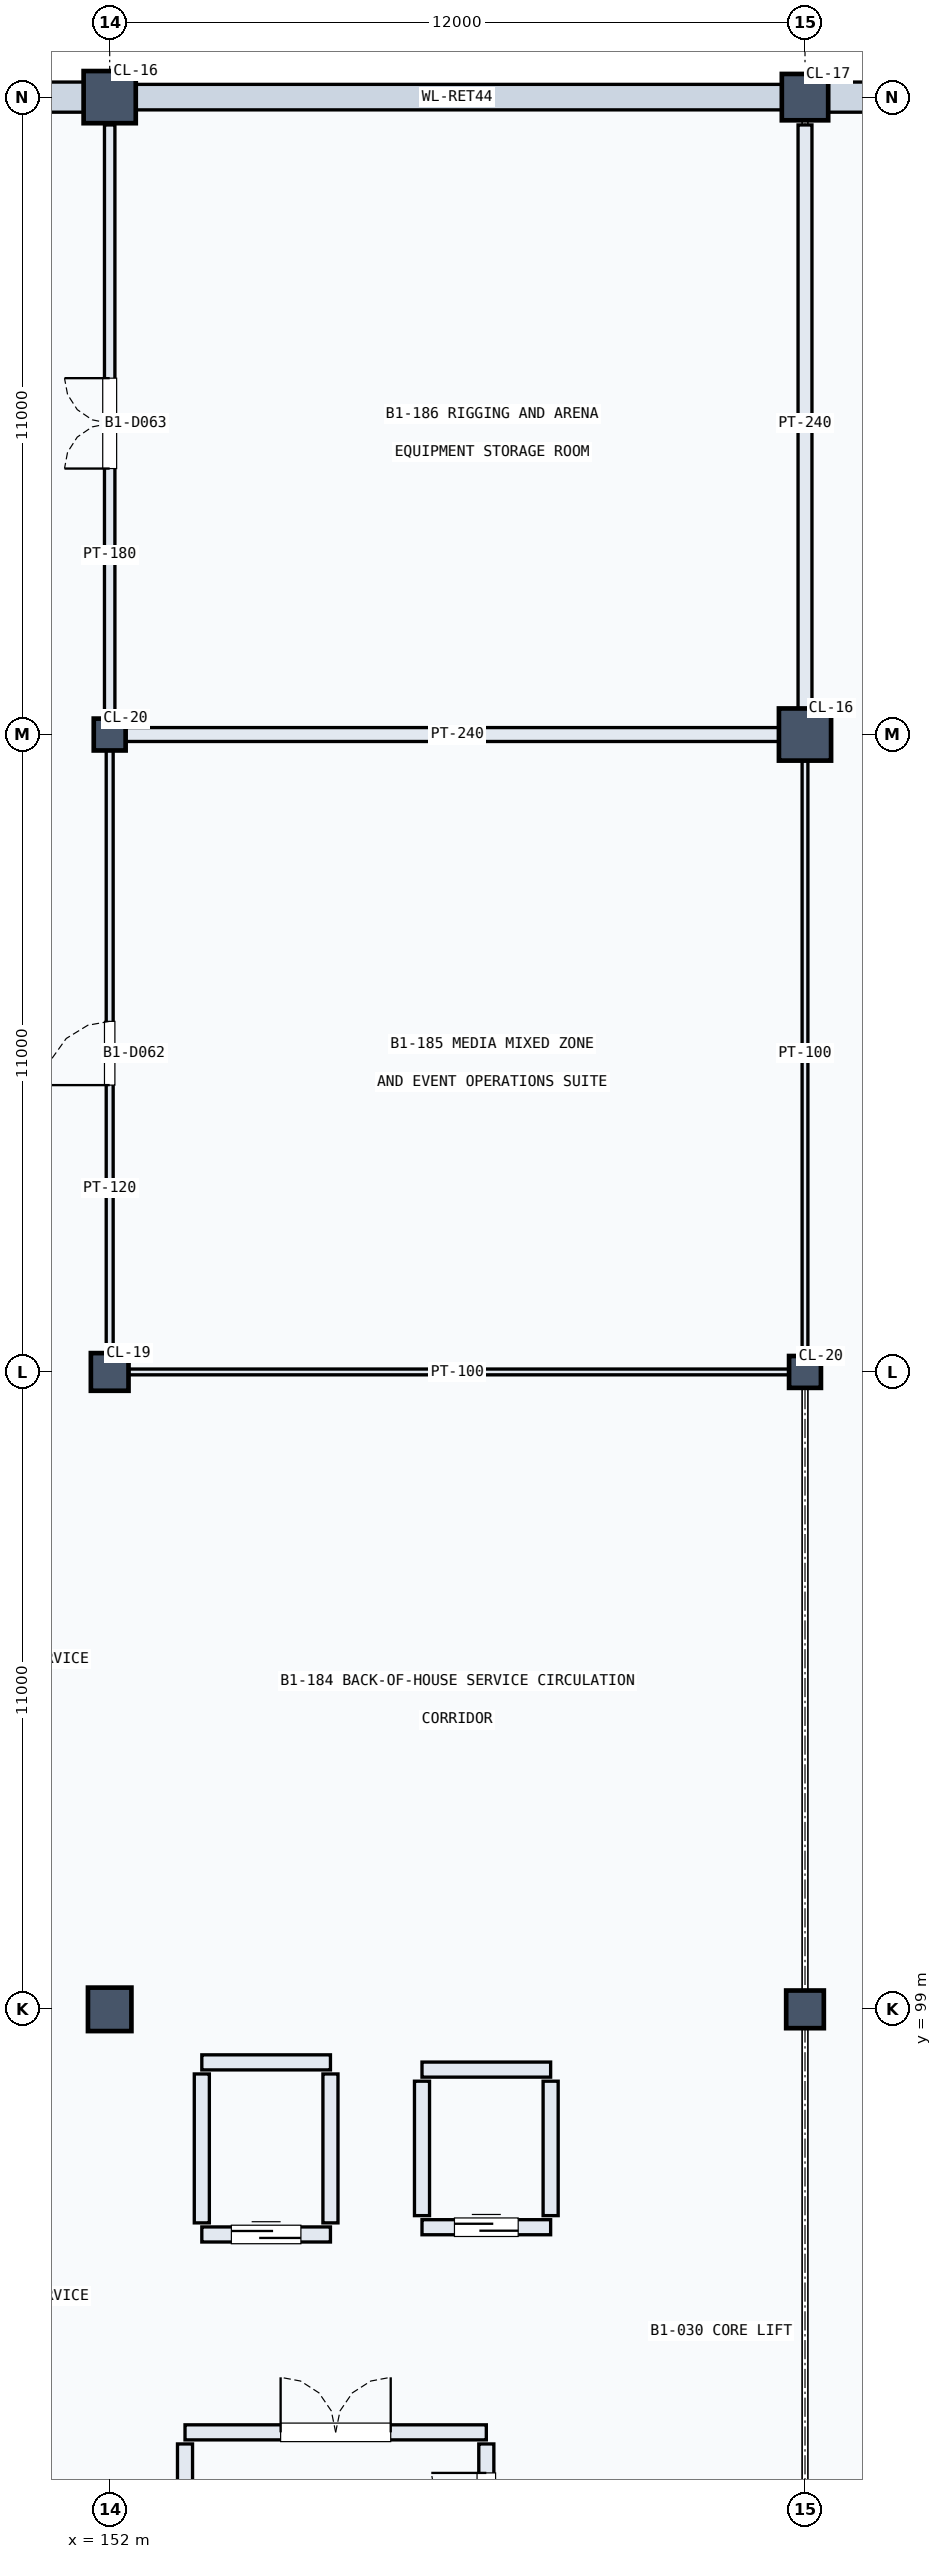
"""IFC4 building model, lengths in metres.
Left out: names, types, materials, properties, quantities, classifications, styles, units other than length and angle.
Written with IfcOpenShell. Run it as: python <this file> out.ifc"""

import sys

from ifc_helpers import new_model, si_unit, direction, frame, frame_2d, origin, origin_2d, place, context, subcontext, project, spatial, rectangle, circle, extrude, element, fill, save


model = new_model("IFC4")
c1 = context("Model", 3, precision=1e-05, world=origin(), true_north=direction((0.0, 1.0)))
c2 = subcontext(c1, "Body", "Model", "MODEL_VIEW")
j1 = project(units=[si_unit("LENGTHUNIT", "METRE"), si_unit("PLANEANGLEUNIT", "RADIAN")], contexts=[c1])
p1 = place(None, origin())
s1 = spatial("IfcSite", under=j1, at=p1, CompositionType="ELEMENT")
p2 = place(p1, origin())
s2 = spatial("IfcBuilding", under=s1, at=p2, CompositionType="ELEMENT")
p3 = place(p2, frame((0.0, 0.0, -5.4)))
s3 = spatial("IfcBuildingStorey", under=s2, at=p3, CompositionType="ELEMENT", Elevation=-5.4)
p4 = place(p3, frame((152.0, 99.0, 0.0), z_axis=(0.0, 0.0, 1.0), x_axis=(1.0, 0.0, 0.0)))
e1 = element("IfcColumn", 1, at=p4, inside=s3, PredefinedType="COLUMN", context=c2, shape_type="SweptSolid", body=[
    extrude(circle(Radius=0.375, at=origin_2d()), origin(), (0.0, 0.0, 1.0), 5.4),
])
p5 = place(p3, frame((152.0, 110.0, 0.0), z_axis=(0.0, 0.0, 1.0), x_axis=(1.0, 0.0, 0.0)))
e2 = element("IfcColumn", 2, at=p5, inside=s3, PredefinedType="COLUMN", context=c2, shape_type="SweptSolid", body=[
    extrude(circle(Radius=0.325, at=origin_2d()), origin(), (0.0, 0.0, 1.0), 5.4),
])
p6 = place(p3, frame((152.0, 121.0, 0.0), z_axis=(0.0, 0.0, 1.0), x_axis=(1.0, 0.0, 0.0)))
e3 = element("IfcColumn", 3, at=p6, inside=s3, PredefinedType="COLUMN", context=c2, shape_type="SweptSolid", body=[
    extrude(circle(Radius=0.275, at=origin_2d()), origin(), (0.0, 0.0, 1.0), 5.4),
])
p7 = place(p3, frame((152.0, 132.0, 0.0), z_axis=(0.0, 0.0, 1.0), x_axis=(1.0, 0.0, 0.0)))
e4 = element("IfcColumn", 4, at=p7, inside=s3, PredefinedType="COLUMN", context=c2, shape_type="SweptSolid", body=[
    extrude(circle(Radius=0.45, at=origin_2d()), origin(), (0.0, 0.0, 1.0), 5.4),
])
p8 = place(p3, frame((164.0, 99.0, 0.0), z_axis=(0.0, 0.0, 1.0), x_axis=(1.0, 0.0, 0.0)))
e5 = element("IfcColumn", 5, at=p8, inside=s3, PredefinedType="COLUMN", context=c2, shape_type="SweptSolid", body=[
    extrude(circle(Radius=0.325, at=origin_2d()), origin(), (0.0, 0.0, 1.0), 5.4),
])
p9 = place(p3, frame((164.0, 110.0, 0.0), z_axis=(0.0, 0.0, 1.0), x_axis=(1.0, 0.0, 0.0)))
e6 = element("IfcColumn", 6, at=p9, inside=s3, PredefinedType="COLUMN", context=c2, shape_type="SweptSolid", body=[
    extrude(circle(Radius=0.275, at=origin_2d()), origin(), (0.0, 0.0, 1.0), 5.4),
])
p10 = place(p3, frame((164.0, 121.0, 0.0), z_axis=(0.0, 0.0, 1.0), x_axis=(1.0, 0.0, 0.0)))
e7 = element("IfcColumn", 7, at=p10, inside=s3, PredefinedType="COLUMN", context=c2, shape_type="SweptSolid", body=[
    extrude(circle(Radius=0.45, at=origin_2d()), origin(), (0.0, 0.0, 1.0), 5.4),
])
p11 = place(p3, frame((164.0, 132.0, 0.0), z_axis=(0.0, 0.0, 1.0), x_axis=(1.0, 0.0, 0.0)))
e8 = element("IfcColumn", 8, at=p11, inside=s3, PredefinedType="COLUMN", context=c2, shape_type="SweptSolid", body=[
    extrude(circle(Radius=0.4, at=origin_2d()), origin(), (0.0, 0.0, 1.0), 5.4),
])
p12 = place(p3, frame((140.22, 132.0, 0.0), z_axis=(0.0, 0.0, 1.0), x_axis=(1.0, 0.0, 0.0)))
e9 = element("IfcWall", 9, at=p12, inside=s3, PredefinedType="SOLIDWALL", context=c2, shape_type="SweptSolid", body=[
    extrude(rectangle(XDim=11.56, YDim=0.52, at=frame_2d((5.78, 0.0))), origin(), (0.0, 0.0, 1.0), 4.23),
])
p13 = place(p3, frame((152.22, 132.0, 0.0), z_axis=(0.0, 0.0, 1.0), x_axis=(1.0, 0.0, 0.0)))
e10 = element("IfcWall", 10, at=p13, inside=s3, PredefinedType="SOLIDWALL", context=c2, shape_type="SweptSolid", body=[
    extrude(rectangle(XDim=11.56, YDim=0.44, at=frame_2d((5.78, 0.0))), origin(), (0.0, 0.0, 1.0), 4.23),
])
p14 = place(p3, frame((164.22, 132.0, 0.0), z_axis=(0.0, 0.0, 1.0), x_axis=(1.0, 0.0, 0.0)))
e11 = element("IfcWall", 11, at=p14, inside=s3, PredefinedType="SOLIDWALL", context=c2, shape_type="SweptSolid", body=[
    extrude(rectangle(XDim=11.56, YDim=0.52, at=frame_2d((5.78, 0.0))), origin(), (0.0, 0.0, 1.0), 4.418),
])
p15 = place(p3, frame((153.59, 95.115, 0.0), z_axis=(0.0, 0.0, 1.0), x_axis=(1.0, 0.0, 0.0)))
e12 = element("IfcWall", 12, at=p15, inside=s3, PredefinedType="SOLIDWALL", context=c2, shape_type="SweptSolid", body=[
    extrude(rectangle(XDim=2.22, YDim=0.26, at=frame_2d((1.11, 0.0))), origin(), (0.0, 0.0, 1.0), 5.04),
])
p16 = place(p15, frame((0.51, 0.0, 0.0)))
e13 = element("IfcOpeningElement", 13, at=p16, cuts=e12, PredefinedType="OPENING", context=c2, shape_type="SweptSolid", body=[
    extrude(rectangle(XDim=1.2, YDim=2.2, at=frame_2d((0.6, 1.1))), frame((0.0, 0.14, 0.0), z_axis=(0.0, -1.0, 0.0), x_axis=(1.0, 0.0, 0.0)), (0.0, 0.0, 1.0), 0.28),
])
p17 = place(p3, frame((153.59, 98.085, 0.0), z_axis=(0.0, 0.0, 1.0), x_axis=(1.0, 0.0, 0.0)))
e14 = element("IfcWall", 14, at=p17, inside=s3, PredefinedType="SOLIDWALL", context=c2, shape_type="SweptSolid", body=[
    extrude(rectangle(XDim=2.22, YDim=0.26, at=frame_2d((1.11, 0.0))), origin(), (0.0, 0.0, 1.0), 5.04),
])
for number, where, z_axis, x_axis in (
    (15, (153.59, 95.315, 0.0), (0.0, 0.0, 1.0), (0.0, 1.0, 0.0)),
    (16, (155.81, 95.315, 0.0), (0.0, 0.0, 1.0), (0.0, 1.0, 0.0)),
):
    element("IfcWall", number, at=place(p3, frame(where, z_axis=z_axis, x_axis=x_axis)), inside=s3, PredefinedType="SOLIDWALL", context=c2, shape_type="SweptSolid", body=[
        extrude(rectangle(XDim=2.57, YDim=0.26, at=frame_2d((1.285, 0.0))), origin(), (0.0, 0.0, 1.0), 5.04),
    ])
p18 = place(p3, frame((157.39, 95.24, 0.0), z_axis=(0.0, 0.0, 1.0), x_axis=(1.0, 0.0, 0.0)))
e17 = element("IfcWall", 17, at=p18, inside=s3, PredefinedType="SOLIDWALL", context=c2, shape_type="SweptSolid", body=[
    extrude(rectangle(XDim=2.22, YDim=0.26, at=frame_2d((1.11, 0.0))), origin(), (0.0, 0.0, 1.0), 5.04),
])
p19 = place(p18, frame((0.56, 0.0, 0.0)))
e18 = element("IfcOpeningElement", 18, at=p19, cuts=e17, PredefinedType="OPENING", context=c2, shape_type="SweptSolid", body=[
    extrude(rectangle(XDim=1.1, YDim=2.15, at=frame_2d((0.55, 1.075))), frame((0.0, 0.14, 0.0), z_axis=(0.0, -1.0, 0.0), x_axis=(1.0, 0.0, 0.0)), (0.0, 0.0, 1.0), 0.28),
])
p20 = place(p3, frame((157.39, 97.96, 0.0), z_axis=(0.0, 0.0, 1.0), x_axis=(1.0, 0.0, 0.0)))
e19 = element("IfcWall", 19, at=p20, inside=s3, PredefinedType="SOLIDWALL", context=c2, shape_type="SweptSolid", body=[
    extrude(rectangle(XDim=2.22, YDim=0.26, at=frame_2d((1.11, 0.0))), origin(), (0.0, 0.0, 1.0), 5.04),
])
for number, where, z_axis, x_axis in (
    (20, (157.39, 95.44, 0.0), (0.0, 0.0, 1.0), (0.0, 1.0, 0.0)),
    (21, (159.61, 95.44, 0.0), (0.0, 0.0, 1.0), (0.0, 1.0, 0.0)),
):
    element("IfcWall", number, at=place(p3, frame(where, z_axis=z_axis, x_axis=x_axis)), inside=s3, PredefinedType="SOLIDWALL", context=c2, shape_type="SweptSolid", body=[
        extrude(rectangle(XDim=2.32, YDim=0.26, at=frame_2d((1.16, 0.0))), origin(), (0.0, 0.0, 1.0), 5.04),
    ])
p21 = place(p3, frame((153.3, 91.7, 0.0), z_axis=(0.0, 0.0, 1.0), x_axis=(1.0, 0.0, 0.0)))
e22 = element("IfcWall", 22, at=p21, inside=s3, PredefinedType="SOLIDWALL", context=c2, shape_type="SweptSolid", body=[
    extrude(rectangle(XDim=5.2, YDim=0.26, at=frame_2d((2.6, 0.0))), origin(), (0.0, 0.0, 1.0), 5.04),
])
p22 = place(p21, frame((1.65, 0.0, 0.0)))
e23 = element("IfcOpeningElement", 23, at=p22, cuts=e22, PredefinedType="OPENING", context=c2, shape_type="SweptSolid", body=[
    extrude(rectangle(XDim=1.9, YDim=2.2, at=frame_2d((0.95, 1.1))), frame((0.0, 0.14, 0.0), z_axis=(0.0, -1.0, 0.0), x_axis=(1.0, 0.0, 0.0)), (0.0, 0.0, 1.0), 0.28),
])
p23 = place(p3, frame((153.3, 88.6, 0.0), z_axis=(0.0, 0.0, 1.0), x_axis=(0.0, 1.0, 0.0)))
e24 = element("IfcWall", 24, at=p23, inside=s3, PredefinedType="SOLIDWALL", context=c2, shape_type="SweptSolid", body=[
    extrude(rectangle(XDim=2.9, YDim=0.26, at=frame_2d((1.45, 0.0))), origin(), (0.0, 0.0, 1.0), 5.04),
])
p24 = place(p3, frame((158.5, 88.6, 0.0), z_axis=(0.0, 0.0, 1.0), x_axis=(0.0, 1.0, 0.0)))
e25 = element("IfcWall", 25, at=p24, inside=s3, PredefinedType="SOLIDWALL", context=c2, shape_type="SweptSolid", body=[
    extrude(rectangle(XDim=2.9, YDim=0.26, at=frame_2d((1.45, 0.0))), origin(), (0.0, 0.0, 1.0), 5.04),
])
p25 = place(p24, frame((0.5, 0.0, 0.0)))
e26 = element("IfcOpeningElement", 26, at=p25, cuts=e25, PredefinedType="OPENING", context=c2, shape_type="SweptSolid", body=[
    extrude(rectangle(XDim=1.9, YDim=2.2, at=frame_2d((0.95, 1.1))), frame((0.0, 0.14, 0.0), z_axis=(0.0, -1.0, 0.0), x_axis=(1.0, 0.0, 0.0)), (0.0, 0.0, 1.0), 0.28),
])
p26 = place(p3, frame((152.0, 110.22, 0.0), z_axis=(0.0, 0.0, 1.0), x_axis=(0.0, 1.0, 0.0)))
e27 = element("IfcWall", 27, at=p26, inside=s3, PredefinedType="PARTITIONING", context=c2, shape_type="SweptSolid", body=[
    extrude(rectangle(XDim=10.56, YDim=0.12, at=frame_2d((5.28, 0.0))), origin(), (0.0, 0.0, 1.0), 4.08),
])
p27 = place(p26, frame((4.73, 0.0, 0.0)))
e28 = element("IfcOpeningElement", 28, at=p27, cuts=e27, PredefinedType="OPENING", context=c2, shape_type="SweptSolid", body=[
    extrude(rectangle(XDim=1.1, YDim=2.1, at=frame_2d((0.55, 1.05))), frame((0.0, 0.07, 0.0), z_axis=(0.0, -1.0, 0.0), x_axis=(1.0, 0.0, 0.0)), (0.0, 0.0, 1.0), 0.14),
])
p28 = place(p3, frame((152.0, 121.22, 0.0), z_axis=(0.0, 0.0, 1.0), x_axis=(0.0, 1.0, 0.0)))
e29 = element("IfcWall", 29, at=p28, inside=s3, PredefinedType="PARTITIONING", context=c2, shape_type="SweptSolid", body=[
    extrude(rectangle(XDim=10.3, YDim=0.18, at=frame_2d((5.15, 0.0))), origin(), (0.0, 0.0, 1.0), 4.08),
])
p29 = place(p28, frame((4.37, 0.0, 0.0)))
e30 = element("IfcOpeningElement", 30, at=p29, cuts=e29, PredefinedType="OPENING", context=c2, shape_type="SweptSolid", body=[
    extrude(rectangle(XDim=1.56, YDim=2.2, at=frame_2d((0.78, 1.1))), frame((0.0, 0.1, 0.0), z_axis=(0.0, -1.0, 0.0), x_axis=(1.0, 0.0, 0.0)), (0.0, 0.0, 1.0), 0.2),
])
p30 = place(p3, frame((152.22, 110.0, 0.0), z_axis=(0.0, 0.0, 1.0), x_axis=(1.0, 0.0, 0.0)))
e31 = element("IfcWall", 31, at=p30, inside=s3, PredefinedType="PARTITIONING", context=c2, shape_type="SweptSolid", body=[
    extrude(rectangle(XDim=11.56, YDim=0.1, at=frame_2d((5.78, 0.0))), origin(), (0.0, 0.0, 1.0), 4.08),
])
p31 = place(p3, frame((164.0, 110.22, 0.0), z_axis=(0.0, 0.0, 1.0), x_axis=(0.0, 1.0, 0.0)))
e32 = element("IfcWall", 32, at=p31, inside=s3, PredefinedType="PARTITIONING", context=c2, shape_type="SweptSolid", body=[
    extrude(rectangle(XDim=10.56, YDim=0.1, at=frame_2d((5.28, 0.0))), origin(), (0.0, 0.0, 1.0), 4.13),
])
p32 = place(p3, frame((164.0, 121.22, 0.0), z_axis=(0.0, 0.0, 1.0), x_axis=(0.0, 1.0, 0.0)))
e33 = element("IfcWall", 33, at=p32, inside=s3, PredefinedType="PARTITIONING", context=c2, shape_type="SweptSolid", body=[
    extrude(rectangle(XDim=10.3, YDim=0.24, at=frame_2d((5.15, 0.0))), origin(), (0.0, 0.0, 1.0), 4.13),
])
p33 = place(p3, frame((152.22, 121.0, 0.0), z_axis=(0.0, 0.0, 1.0), x_axis=(1.0, 0.0, 0.0)))
e34 = element("IfcWall", 34, at=p33, inside=s3, PredefinedType="PARTITIONING", context=c2, shape_type="SweptSolid", body=[
    extrude(rectangle(XDim=11.56, YDim=0.24, at=frame_2d((5.78, 0.0))), origin(), (0.0, 0.0, 1.0), 4.08),
])
p34 = place(p16, origin())
e35 = element("IfcDoor", 35, at=p34, inside=s3, OperationType="SLIDING_TO_LEFT", PredefinedType="DOOR", context=c2, shape_type="SweptSolid", body=[
    extrude(rectangle(XDim=1.2, YDim=2.2, at=frame_2d((0.6, 1.1))), frame((0.0, 0.025, 0.0), z_axis=(0.0, -1.0, 0.0), x_axis=(1.0, 0.0, 0.0)), (0.0, 0.0, 1.0), 0.05),
])
fill(e13, e35)
p35 = place(p19, origin())
e36 = element("IfcDoor", 36, at=p35, inside=s3, OperationType="SLIDING_TO_LEFT", PredefinedType="DOOR", context=c2, shape_type="SweptSolid", body=[
    extrude(rectangle(XDim=1.1, YDim=2.15, at=frame_2d((0.55, 1.075))), frame((0.0, 0.025, 0.0), z_axis=(0.0, -1.0, 0.0), x_axis=(1.0, 0.0, 0.0)), (0.0, 0.0, 1.0), 0.05),
])
fill(e18, e36)
p36 = place(p22, origin())
e37 = element("IfcDoor", 37, at=p36, inside=s3, OperationType="DOUBLE_DOOR_SINGLE_SWING", PredefinedType="DOOR", context=c2, shape_type="SweptSolid", body=[
    extrude(rectangle(XDim=1.9, YDim=2.2, at=frame_2d((0.95, 1.1))), frame((0.0, 0.025, 0.0), z_axis=(0.0, -1.0, 0.0), x_axis=(1.0, 0.0, 0.0)), (0.0, 0.0, 1.0), 0.05),
])
fill(e23, e37)
p37 = place(p25, origin())
e38 = element("IfcDoor", 38, at=p37, inside=s3, OperationType="DOUBLE_DOOR_SINGLE_SWING", PredefinedType="DOOR", context=c2, shape_type="SweptSolid", body=[
    extrude(rectangle(XDim=1.9, YDim=2.2, at=frame_2d((0.95, 1.1))), frame((0.0, 0.025, 0.0), z_axis=(0.0, -1.0, 0.0), x_axis=(1.0, 0.0, 0.0)), (0.0, 0.0, 1.0), 0.05),
])
fill(e26, e38)
p38 = place(p27, origin())
e39 = element("IfcDoor", 39, at=p38, inside=s3, OperationType="SINGLE_SWING_LEFT", PredefinedType="DOOR", context=c2, shape_type="SweptSolid", body=[
    extrude(rectangle(XDim=1.1, YDim=2.1, at=frame_2d((0.55, 1.05))), frame((0.0, 0.025, 0.0), z_axis=(0.0, -1.0, 0.0), x_axis=(1.0, 0.0, 0.0)), (0.0, 0.0, 1.0), 0.05),
])
fill(e28, e39)
p39 = place(p29, origin())
e40 = element("IfcDoor", 40, at=p39, inside=s3, OperationType="DOUBLE_DOOR_SINGLE_SWING", PredefinedType="DOOR", context=c2, shape_type="SweptSolid", body=[
    extrude(rectangle(XDim=1.56, YDim=2.2, at=frame_2d((0.78, 1.1))), frame((0.0, 0.025, 0.0), z_axis=(0.0, -1.0, 0.0), x_axis=(1.0, 0.0, 0.0)), (0.0, 0.0, 1.0), 0.05),
])
fill(e30, e40)
save(model, sys.argv[1])
